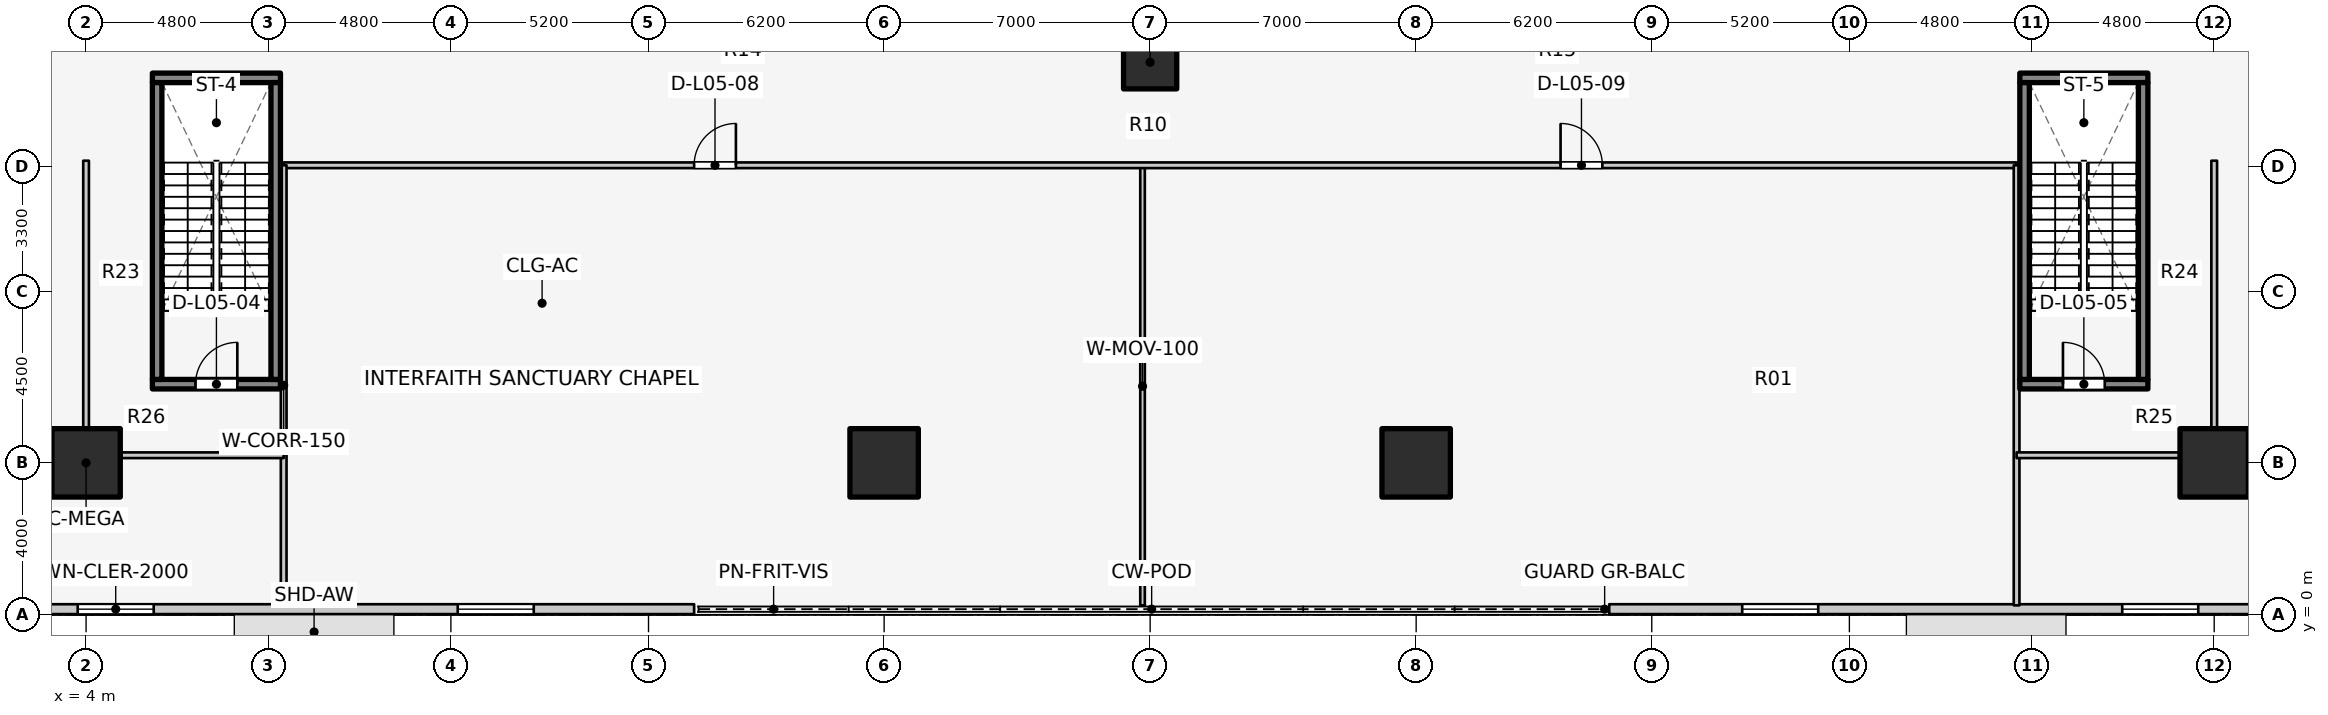
"""IFC4 building model, lengths in metres.
Left out: names, types, materials, properties, quantities, classifications, styles, units other than length and angle.
Written with IfcOpenShell. Run it as: python <this file> out.ifc"""

import sys

from ifc_helpers import new_model, si_unit, direction, frame, frame_2d, origin, origin_2d, place, context, subcontext, project, spatial, rectangle, extrude, element, fill, save


model = new_model("IFC4")
c1 = context("Model", 3, precision=1e-05, world=origin(), true_north=direction((0.0, 1.0)))
c2 = subcontext(c1, "Body", "Model", "MODEL_VIEW")
j1 = project(units=[si_unit("LENGTHUNIT", "METRE"), si_unit("PLANEANGLEUNIT", "RADIAN")], contexts=[c1])
p1 = place(None, origin())
s1 = spatial("IfcSite", under=j1, at=p1, CompositionType="ELEMENT")
p2 = place(p1, origin())
s2 = spatial("IfcBuilding", under=s1, at=p2, CompositionType="ELEMENT")
p3 = place(p2, frame((0.0, 0.0, 18.4)))
s3 = spatial("IfcBuildingStorey", under=s2, at=p3, CompositionType="ELEMENT", Elevation=18.4)
p4 = place(p3, frame((5.745, 6.07, 0.0), z_axis=(0.0, 0.0, 1.0), x_axis=(1.0, 0.0, 0.0)))
e1 = element("IfcWall", 1, at=p4, inside=s3, PredefinedType="SOLIDWALL", context=c2, shape_type="SweptSolid", body=[
    extrude(rectangle(XDim=3.37, YDim=0.25, at=frame_2d((1.685, 0.0))), origin(), (0.0, 0.0, 1.0), 4.6),
])
p5 = place(p4, frame((1.135, 0.0, 0.0)))
e2 = element("IfcOpeningElement", 2, at=p5, cuts=e1, PredefinedType="OPENING", context=c2, shape_type="SweptSolid", body=[
    extrude(rectangle(XDim=1.1, YDim=2.1, at=frame_2d((0.55, 1.05))), frame((0.0, 0.135, 0.0), z_axis=(0.0, -1.0, 0.0), x_axis=(1.0, 0.0, 0.0)), (0.0, 0.0, 1.0), 0.27),
])
p6 = place(p3, frame((5.745, 14.13, 0.0), z_axis=(0.0, 0.0, 1.0), x_axis=(1.0, 0.0, 0.0)))
e3 = element("IfcWall", 3, at=p6, inside=s3, PredefinedType="SOLIDWALL", context=c2, shape_type="SweptSolid", body=[
    extrude(rectangle(XDim=3.37, YDim=0.25, at=frame_2d((1.685, 0.0))), origin(), (0.0, 0.0, 1.0), 4.6),
])
for number, where, z_axis, x_axis in (
    (4, (5.87, 6.195, 0.0), (0.0, 0.0, 1.0), (0.0, 1.0, 0.0)),
    (5, (8.99, 6.195, 0.0), (0.0, 0.0, 1.0), (0.0, 1.0, 0.0)),
):
    element("IfcWall", number, at=place(p3, frame(where, z_axis=z_axis, x_axis=x_axis)), inside=s3, PredefinedType="SOLIDWALL", context=c2, shape_type="SweptSolid", body=[
        extrude(rectangle(XDim=7.81, YDim=0.25, at=frame_2d((3.905, 0.0))), origin(), (0.0, 0.0, 1.0), 4.6),
    ])
p7 = place(p3, frame((54.885, 6.07, 0.0), z_axis=(0.0, 0.0, 1.0), x_axis=(1.0, 0.0, 0.0)))
e6 = element("IfcWall", 6, at=p7, inside=s3, PredefinedType="SOLIDWALL", context=c2, shape_type="SweptSolid", body=[
    extrude(rectangle(XDim=3.37, YDim=0.25, at=frame_2d((1.685, 0.0))), origin(), (0.0, 0.0, 1.0), 4.6),
])
p8 = place(p7, frame((1.135, 0.0, 0.0)))
e7 = element("IfcOpeningElement", 7, at=p8, cuts=e6, PredefinedType="OPENING", context=c2, shape_type="SweptSolid", body=[
    extrude(rectangle(XDim=1.1, YDim=2.1, at=frame_2d((0.55, 1.05))), frame((0.0, 0.135, 0.0), z_axis=(0.0, -1.0, 0.0), x_axis=(1.0, 0.0, 0.0)), (0.0, 0.0, 1.0), 0.27),
])
p9 = place(p3, frame((54.885, 14.13, 0.0), z_axis=(0.0, 0.0, 1.0), x_axis=(1.0, 0.0, 0.0)))
e8 = element("IfcWall", 8, at=p9, inside=s3, PredefinedType="SOLIDWALL", context=c2, shape_type="SweptSolid", body=[
    extrude(rectangle(XDim=3.37, YDim=0.25, at=frame_2d((1.685, 0.0))), origin(), (0.0, 0.0, 1.0), 4.6),
])
for number, where, z_axis, x_axis in (
    (9, (55.01, 6.195, 0.0), (0.0, 0.0, 1.0), (0.0, 1.0, 0.0)),
    (10, (58.13, 6.195, 0.0), (0.0, 0.0, 1.0), (0.0, 1.0, 0.0)),
):
    element("IfcWall", number, at=place(p3, frame(where, z_axis=z_axis, x_axis=x_axis)), inside=s3, PredefinedType="SOLIDWALL", context=c2, shape_type="SweptSolid", body=[
        extrude(rectangle(XDim=7.81, YDim=0.25, at=frame_2d((3.905, 0.0))), origin(), (0.0, 0.0, 1.0), 4.6),
    ])
for number, where, z_axis, x_axis in (
    (11, (4.0, 4.0, 0.0), (0.0, 0.0, 1.0), (1.0, 0.0, 0.0)),
    (12, (25.0, 4.0, 0.0), (0.0, 0.0, 1.0), (1.0, 0.0, 0.0)),
    (13, (39.0, 4.0, 0.0), (0.0, 0.0, 1.0), (1.0, 0.0, 0.0)),
    (14, (60.0, 4.0, 0.0), (0.0, 0.0, 1.0), (1.0, 0.0, 0.0)),
):
    element("IfcColumn", number, at=place(p3, frame(where, z_axis=z_axis, x_axis=x_axis)), inside=s3, PredefinedType="COLUMN", context=c2, shape_type="SweptSolid", body=[
        extrude(rectangle(XDim=1.8, YDim=1.8, at=origin_2d()), origin(), (0.0, 0.0, 1.0), 4.6),
    ])
p10 = place(p3, frame((32.0, 14.54, 0.0), z_axis=(0.0, 0.0, 1.0), x_axis=(1.0, 0.0, 0.0)))
e15 = element("IfcColumn", 15, at=p10, inside=s3, PredefinedType="COLUMN", context=c2, shape_type="SweptSolid", body=[
    extrude(rectangle(XDim=1.4, YDim=1.4, at=origin_2d()), origin(), (0.0, 0.0, 1.0), 4.6),
])
p11 = place(p3, frame((0.28, 0.15, 0.0), z_axis=(0.0, 0.0, 1.0), x_axis=(1.0, 0.0, 0.0)))
e16 = element("IfcWall", 16, at=p11, inside=s3, PredefinedType="STANDARD", context=c2, shape_type="SweptSolid", body=[
    extrude(rectangle(XDim=19.72, YDim=0.26, at=frame_2d((9.86, 0.0))), origin(), (0.0, 0.0, 1.0), 4.28),
])
p12 = place(p11, frame((3.5, 0.0, 2.2)))
e17 = element("IfcOpeningElement", 17, at=p12, cuts=e16, PredefinedType="OPENING", context=c2, shape_type="SweptSolid", body=[
    extrude(rectangle(XDim=2.0, YDim=1.1, at=frame_2d((1.0, 0.55))), frame((0.0, 0.14, 0.0), z_axis=(0.0, -1.0, 0.0), x_axis=(1.0, 0.0, 0.0)), (0.0, 0.0, 1.0), 0.28),
])
p13 = place(p11, frame((13.5, 0.0, 2.2)))
e18 = element("IfcOpeningElement", 18, at=p13, cuts=e16, PredefinedType="OPENING", context=c2, shape_type="SweptSolid", body=[
    extrude(rectangle(XDim=2.0, YDim=1.1, at=frame_2d((1.0, 0.55))), frame((0.0, 0.14, 0.0), z_axis=(0.0, -1.0, 0.0), x_axis=(1.0, 0.0, 0.0)), (0.0, 0.0, 1.0), 0.28),
])
p14 = place(p3, frame((44.08, 0.15, 0.0), z_axis=(0.0, 0.0, 1.0), x_axis=(1.0, 0.0, 0.0)))
e19 = element("IfcWall", 19, at=p14, inside=s3, PredefinedType="STANDARD", context=c2, shape_type="SweptSolid", body=[
    extrude(rectangle(XDim=19.64, YDim=0.26, at=frame_2d((9.82, 0.0))), origin(), (0.0, 0.0, 1.0), 4.28),
])
p15 = place(p14, frame((3.5, 0.0, 2.2)))
e20 = element("IfcOpeningElement", 20, at=p15, cuts=e19, PredefinedType="OPENING", context=c2, shape_type="SweptSolid", body=[
    extrude(rectangle(XDim=2.0, YDim=1.1, at=frame_2d((1.0, 0.55))), frame((0.0, 0.14, 0.0), z_axis=(0.0, -1.0, 0.0), x_axis=(1.0, 0.0, 0.0)), (0.0, 0.0, 1.0), 0.28),
])
p16 = place(p14, frame((13.5, 0.0, 2.2)))
e21 = element("IfcOpeningElement", 21, at=p16, cuts=e19, PredefinedType="OPENING", context=c2, shape_type="SweptSolid", body=[
    extrude(rectangle(XDim=2.0, YDim=1.1, at=frame_2d((1.0, 0.55))), frame((0.0, 0.14, 0.0), z_axis=(0.0, -1.0, 0.0), x_axis=(1.0, 0.0, 0.0)), (0.0, 0.0, 1.0), 0.28),
])
for number, where, z_axis, x_axis in (
    (22, (30.157, 15.157, 0.0), (0.0, 0.0, 1.0), (0.989, -0.149, 0.0)),
    (23, (32.0, 14.88, 0.0), (0.0, 0.0, 1.0), (0.989, 0.149, 0.0)),
):
    element("IfcWall", number, at=place(p3, frame(where, z_axis=z_axis, x_axis=x_axis)), inside=s3, PredefinedType="STANDARD", context=c2, shape_type="SweptSolid", body=[
        extrude(rectangle(XDim=1.864, YDim=0.23, at=frame_2d((0.932, 0.0))), origin(), (0.0, 0.0, 1.0), 3.28),
    ])
p17 = place(p3, frame((31.8, 0.25, 0.0), z_axis=(0.0, 0.0, 1.0), x_axis=(0.0, 1.0, 0.0)))
e24 = element("IfcWall", 24, at=p17, inside=s3, PredefinedType="MOVABLE", context=c2, shape_type="SweptSolid", body=[
    extrude(rectangle(XDim=11.53, YDim=0.12, at=frame_2d((5.765, 0.0))), origin(), (0.0, 0.0, 1.0), 3.3),
])
p18 = place(p3, frame((9.2, 11.83, 0.0), z_axis=(0.0, 0.0, 1.0), x_axis=(1.0, 0.0, 0.0)))
e25 = element("IfcWall", 25, at=p18, inside=s3, PredefinedType="PARTITIONING", context=c2, shape_type="SweptSolid", body=[
    extrude(rectangle(XDim=45.6, YDim=0.15, at=frame_2d((22.8, 0.0))), origin(), (0.0, 0.0, 1.0), 3.3),
])
p19 = place(p18, frame((10.8, 0.0, 0.0)))
e26 = element("IfcOpeningElement", 26, at=p19, cuts=e25, PredefinedType="OPENING", context=c2, shape_type="SweptSolid", body=[
    extrude(rectangle(XDim=1.1, YDim=2.1, at=frame_2d((0.55, 1.05))), frame((0.0, 0.085, 0.0), z_axis=(0.0, -1.0, 0.0), x_axis=(1.0, 0.0, 0.0)), (0.0, 0.0, 1.0), 0.17),
])
p20 = place(p18, frame((33.6, 0.0, 0.0)))
e27 = element("IfcOpeningElement", 27, at=p20, cuts=e25, PredefinedType="OPENING", context=c2, shape_type="SweptSolid", body=[
    extrude(rectangle(XDim=1.1, YDim=2.1, at=frame_2d((0.55, 1.05))), frame((0.0, 0.085, 0.0), z_axis=(0.0, -1.0, 0.0), x_axis=(1.0, 0.0, 0.0)), (0.0, 0.0, 1.0), 0.17),
])
for number, where, z_axis, x_axis in (
    (28, (9.2, 0.25, 0.0), (0.0, 0.0, 1.0), (0.0, 1.0, 0.0)),
    (29, (54.8, 0.25, 0.0), (0.0, 0.0, 1.0), (0.0, 1.0, 0.0)),
):
    element("IfcWall", number, at=place(p3, frame(where, z_axis=z_axis, x_axis=x_axis)), inside=s3, PredefinedType="PARTITIONING", context=c2, shape_type="SweptSolid", body=[
        extrude(rectangle(XDim=11.58, YDim=0.15, at=frame_2d((5.79, 0.0))), origin(), (0.0, 0.0, 1.0), 3.3),
    ])
p21 = place(p3, frame((4.0, 4.2, 0.0), z_axis=(0.0, 0.0, 1.0), x_axis=(0.0, 1.0, 0.0)))
e30 = element("IfcWall", 30, at=p21, inside=s3, PredefinedType="PARTITIONING", context=c2, shape_type="SweptSolid", body=[
    extrude(rectangle(XDim=7.75, YDim=0.15, at=frame_2d((3.875, 0.0))), origin(), (0.0, 0.0, 1.0), 3.3),
])
p22 = place(p3, frame((4.0, 4.2, 0.0), z_axis=(0.0, 0.0, 1.0), x_axis=(1.0, 0.0, 0.0)))
e31 = element("IfcWall", 31, at=p22, inside=s3, PredefinedType="PARTITIONING", context=c2, shape_type="SweptSolid", body=[
    extrude(rectangle(XDim=5.2, YDim=0.15, at=frame_2d((2.6, 0.0))), origin(), (0.0, 0.0, 1.0), 3.3),
])
p23 = place(p3, frame((60.0, 4.2, 0.0), z_axis=(0.0, 0.0, 1.0), x_axis=(0.0, 1.0, 0.0)))
e32 = element("IfcWall", 32, at=p23, inside=s3, PredefinedType="PARTITIONING", context=c2, shape_type="SweptSolid", body=[
    extrude(rectangle(XDim=7.75, YDim=0.15, at=frame_2d((3.875, 0.0))), origin(), (0.0, 0.0, 1.0), 3.3),
])
p24 = place(p3, frame((54.8, 4.2, 0.0), z_axis=(0.0, 0.0, 1.0), x_axis=(1.0, 0.0, 0.0)))
e33 = element("IfcWall", 33, at=p24, inside=s3, PredefinedType="PARTITIONING", context=c2, shape_type="SweptSolid", body=[
    extrude(rectangle(XDim=5.2, YDim=0.15, at=frame_2d((2.6, 0.0))), origin(), (0.0, 0.0, 1.0), 3.3),
])
p25 = place(p12, origin())
e34 = element("IfcWindow", 34, at=p25, inside=s3, PartitioningType="SINGLE_PANEL", PredefinedType="WINDOW", context=c2, shape_type="SweptSolid", body=[
    extrude(rectangle(XDim=2.0, YDim=1.1, at=frame_2d((1.0, 0.55))), frame((0.0, 0.03, 0.0), z_axis=(0.0, -1.0, 0.0), x_axis=(1.0, 0.0, 0.0)), (0.0, 0.0, 1.0), 0.06),
])
fill(e17, e34)
p26 = place(p13, origin())
e35 = element("IfcWindow", 35, at=p26, inside=s3, PartitioningType="SINGLE_PANEL", PredefinedType="WINDOW", context=c2, shape_type="SweptSolid", body=[
    extrude(rectangle(XDim=2.0, YDim=1.1, at=frame_2d((1.0, 0.55))), frame((0.0, 0.03, 0.0), z_axis=(0.0, -1.0, 0.0), x_axis=(1.0, 0.0, 0.0)), (0.0, 0.0, 1.0), 0.06),
])
fill(e18, e35)
p27 = place(p15, origin())
e36 = element("IfcWindow", 36, at=p27, inside=s3, PartitioningType="SINGLE_PANEL", PredefinedType="WINDOW", context=c2, shape_type="SweptSolid", body=[
    extrude(rectangle(XDim=2.0, YDim=1.1, at=frame_2d((1.0, 0.55))), frame((0.0, 0.03, 0.0), z_axis=(0.0, -1.0, 0.0), x_axis=(1.0, 0.0, 0.0)), (0.0, 0.0, 1.0), 0.06),
])
fill(e20, e36)
p28 = place(p16, origin())
e37 = element("IfcWindow", 37, at=p28, inside=s3, PartitioningType="SINGLE_PANEL", PredefinedType="WINDOW", context=c2, shape_type="SweptSolid", body=[
    extrude(rectangle(XDim=2.0, YDim=1.1, at=frame_2d((1.0, 0.55))), frame((0.0, 0.03, 0.0), z_axis=(0.0, -1.0, 0.0), x_axis=(1.0, 0.0, 0.0)), (0.0, 0.0, 1.0), 0.06),
])
fill(e21, e37)
p29 = place(p5, origin())
e38 = element("IfcDoor", 38, at=p29, inside=s3, OperationType="SINGLE_SWING_RIGHT", PredefinedType="DOOR", context=c2, shape_type="SweptSolid", body=[
    extrude(rectangle(XDim=1.1, YDim=2.1, at=frame_2d((0.55, 1.05))), frame((0.0, 0.025, 0.0), z_axis=(0.0, -1.0, 0.0), x_axis=(1.0, 0.0, 0.0)), (0.0, 0.0, 1.0), 0.05),
])
fill(e2, e38)
p30 = place(p8, origin())
e39 = element("IfcDoor", 39, at=p30, inside=s3, OperationType="SINGLE_SWING_LEFT", PredefinedType="DOOR", context=c2, shape_type="SweptSolid", body=[
    extrude(rectangle(XDim=1.1, YDim=2.1, at=frame_2d((0.55, 1.05))), frame((0.0, 0.025, 0.0), z_axis=(0.0, -1.0, 0.0), x_axis=(1.0, 0.0, 0.0)), (0.0, 0.0, 1.0), 0.05),
])
fill(e7, e39)
p31 = place(p19, origin())
e40 = element("IfcDoor", 40, at=p31, inside=s3, OperationType="SINGLE_SWING_RIGHT", PredefinedType="DOOR", context=c2, shape_type="SweptSolid", body=[
    extrude(rectangle(XDim=1.1, YDim=2.1, at=frame_2d((0.55, 1.05))), frame((0.0, 0.025, 0.0), z_axis=(0.0, -1.0, 0.0), x_axis=(1.0, 0.0, 0.0)), (0.0, 0.0, 1.0), 0.05),
])
fill(e26, e40)
p32 = place(p20, origin())
e41 = element("IfcDoor", 41, at=p32, inside=s3, OperationType="SINGLE_SWING_LEFT", PredefinedType="DOOR", context=c2, shape_type="SweptSolid", body=[
    extrude(rectangle(XDim=1.1, YDim=2.1, at=frame_2d((0.55, 1.05))), frame((0.0, 0.025, 0.0), z_axis=(0.0, -1.0, 0.0), x_axis=(1.0, 0.0, 0.0)), (0.0, 0.0, 1.0), 0.05),
])
fill(e27, e41)
save(model, sys.argv[1])
